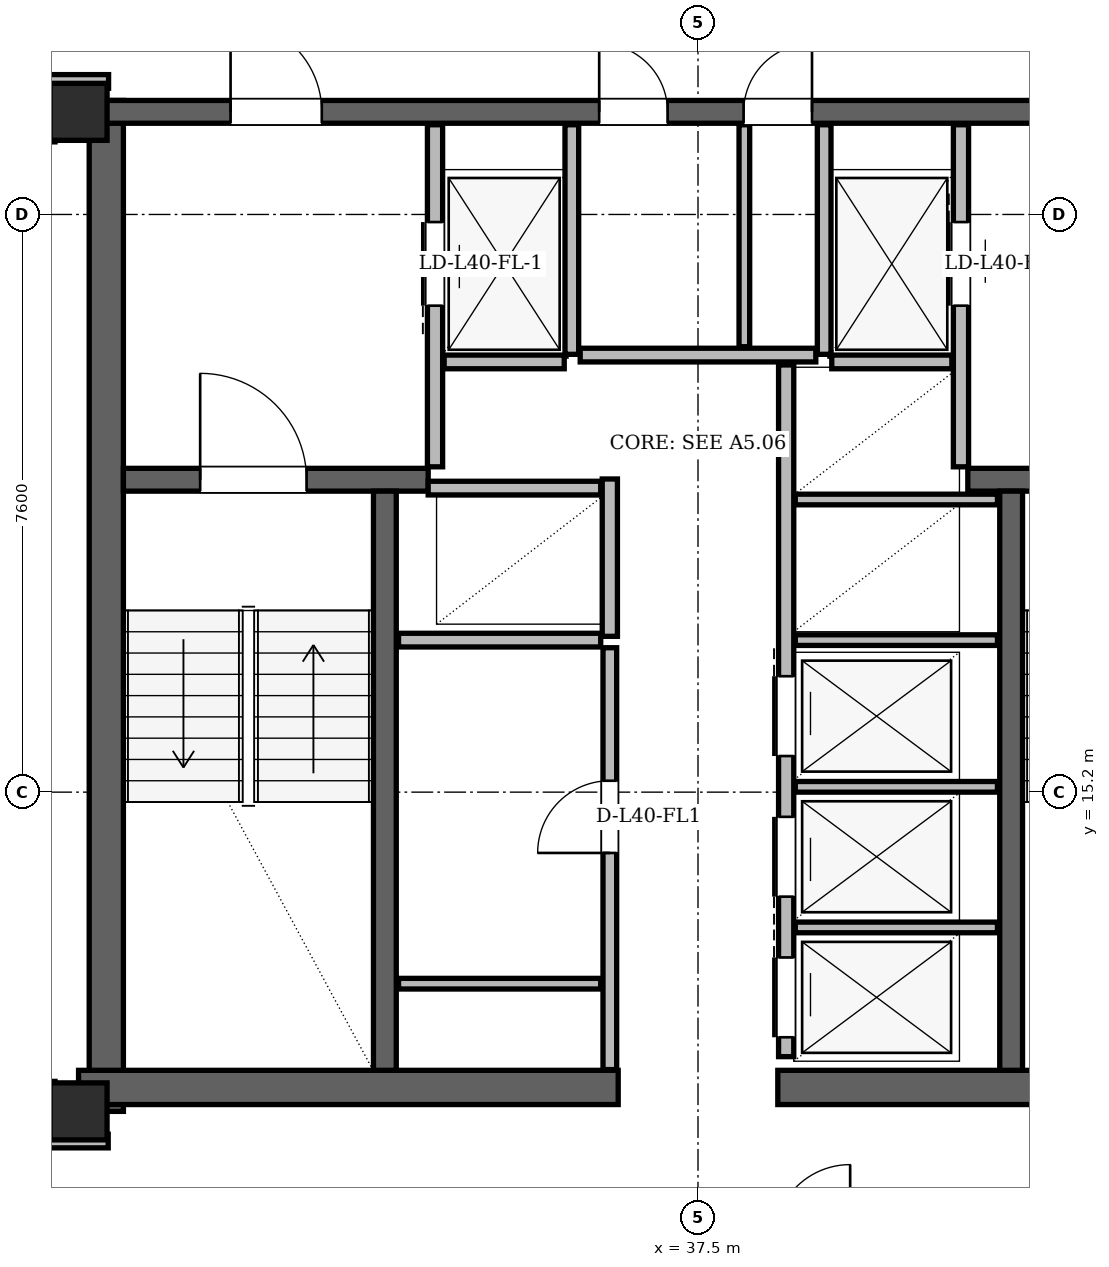
"""IFC4 building model, lengths in metres.
Left out: names, types, materials, properties, quantities, classifications, styles, units other than length and angle.
Written with IfcOpenShell. Run it as: python <this file> out.ifc"""

import sys

from ifc_helpers import new_model, si_unit, direction, frame, frame_2d, origin, origin_2d, place, context, subcontext, project, spatial, rectangle, hollow_rectangle, extrude, element, fill, save


model = new_model("IFC4")
c1 = context("Model", 3, precision=1e-05, world=origin(), true_north=direction((0.0, 1.0)))
c2 = subcontext(c1, "Body", "Model", "MODEL_VIEW")
j1 = project(units=[si_unit("LENGTHUNIT", "METRE"), si_unit("PLANEANGLEUNIT", "RADIAN")], contexts=[c1])
p1 = place(None, origin())
s1 = spatial("IfcSite", under=j1, at=p1, CompositionType="ELEMENT")
p2 = place(p1, origin())
s2 = spatial("IfcBuilding", under=s1, at=p2, CompositionType="ELEMENT")
p3 = place(p2, frame((0.0, 0.0, 153.0)))
s3 = spatial("IfcBuildingStorey", under=s2, at=p3, CompositionType="ELEMENT", Elevation=153.0)
for number, where, z_axis, x_axis in (
    (1, (29.35, 11.0, 0.0), (0.0, 0.0, 1.0), (1.0, 0.0, 0.0)),
    (2, (29.35, 24.15, 0.0), (0.0, 0.0, 1.0), (1.0, 0.0, 0.0)),
):
    element("IfcColumn", number, at=place(p3, frame(where, z_axis=z_axis, x_axis=x_axis)), inside=s3, PredefinedType="COLUMN", context=c2, shape_type="SweptSolid", body=[
        extrude(hollow_rectangle(XDim=0.75, YDim=0.75, WallThickness=0.06, at=origin_2d()), origin(), (0.0, 0.0, 1.0), 3.6),
    ])
p4 = place(p3, frame((29.715, 11.0, 0.0), z_axis=(0.0, 0.0, 1.0), x_axis=(0.0, 1.0, 0.0)))
e3 = element("IfcWall", 3, at=p4, inside=s3, PredefinedType="SHEAR", context=c2, shape_type="SweptSolid", body=[
    extrude(rectangle(XDim=13.3, YDim=0.45, at=frame_2d((6.65, 0.0))), origin(), (0.0, 0.0, 1.0), 3.38),
])
for number, where, z_axis, x_axis in (
    (4, (29.35, 11.315, 0.0), (0.0, 0.0, 1.0), (1.0, 0.0, 0.0)),
    (5, (38.55, 11.315, 0.0), (0.0, 0.0, 1.0), (1.0, 0.0, 0.0)),
):
    element("IfcWall", number, at=place(p3, frame(where, z_axis=z_axis, x_axis=x_axis)), inside=s3, PredefinedType="SHEAR", context=c2, shape_type="SweptSolid", body=[
        extrude(rectangle(XDim=7.1, YDim=0.45, at=frame_2d((3.55, 0.0))), origin(), (0.0, 0.0, 1.0), 3.38),
    ])
p5 = place(p3, frame((29.65, 24.15, 0.0), z_axis=(0.0, 0.0, 1.0), x_axis=(1.0, 0.0, 0.0)))
e6 = element("IfcWall", 6, at=p5, inside=s3, PredefinedType="SHEAR", context=c2, shape_type="SweptSolid", body=[
    extrude(rectangle(XDim=15.7, YDim=0.3, at=frame_2d((7.85, 0.0))), origin(), (0.0, 0.0, 1.0), 3.38),
])
p6 = place(p5, frame((1.7, 0.0, 0.0)))
e7 = element("IfcOpeningElement", 7, at=p6, cuts=e6, PredefinedType="OPENING", context=c2, shape_type="SweptSolid", body=[
    extrude(rectangle(XDim=1.2, YDim=2.2, at=frame_2d((0.6, 1.1))), frame((0.0, 0.15, 0.0), z_axis=(0.0, -1.0, 0.0), x_axis=(1.0, 0.0, 0.0)), (0.0, 0.0, 1.0), 0.3),
])
p7 = place(p5, frame((12.8, 0.0, 0.0)))
e8 = element("IfcOpeningElement", 8, at=p7, cuts=e6, PredefinedType="OPENING", context=c2, shape_type="SweptSolid", body=[
    extrude(rectangle(XDim=1.2, YDim=2.2, at=frame_2d((0.6, 1.1))), frame((0.0, 0.15, 0.0), z_axis=(0.0, -1.0, 0.0), x_axis=(1.0, 0.0, 0.0)), (0.0, 0.0, 1.0), 0.3),
])
p8 = place(p5, frame((6.55, 0.0, 0.0)))
e9 = element("IfcOpeningElement", 9, at=p8, cuts=e6, PredefinedType="OPENING", context=c2, shape_type="SweptSolid", body=[
    extrude(rectangle(XDim=0.9, YDim=2.05, at=frame_2d((0.45, 1.025))), frame((0.0, 0.15, 0.0), z_axis=(0.0, -1.0, 0.0), x_axis=(1.0, 0.0, 0.0)), (0.0, 0.0, 1.0), 0.3),
])
p9 = place(p5, frame((8.45, 0.0, 0.0)))
e10 = element("IfcOpeningElement", 10, at=p9, cuts=e6, PredefinedType="OPENING", context=c2, shape_type="SweptSolid", body=[
    extrude(rectangle(XDim=0.9, YDim=2.05, at=frame_2d((0.45, 1.025))), frame((0.0, 0.15, 0.0), z_axis=(0.0, -1.0, 0.0), x_axis=(1.0, 0.0, 0.0)), (0.0, 0.0, 1.0), 0.3),
])
p10 = place(p3, frame((29.94, 19.31, 0.0), z_axis=(0.0, 0.0, 1.0), x_axis=(1.0, 0.0, 0.0)))
e11 = element("IfcWall", 11, at=p10, inside=s3, PredefinedType="SHEAR", context=c2, shape_type="SweptSolid", body=[
    extrude(rectangle(XDim=4.01, YDim=0.3, at=frame_2d((2.005, 0.0))), origin(), (0.0, 0.0, 1.0), 3.38),
])
p11 = place(p10, frame((1.01, 0.0, 0.0)))
e12 = element("IfcOpeningElement", 12, at=p11, cuts=e11, PredefinedType="OPENING", context=c2, shape_type="SweptSolid", body=[
    extrude(rectangle(XDim=1.4, YDim=2.2, at=frame_2d((0.7, 1.1))), frame((0.0, 0.15, 0.0), z_axis=(0.0, -1.0, 0.0), x_axis=(1.0, 0.0, 0.0)), (0.0, 0.0, 1.0), 0.3),
])
p12 = place(p3, frame((41.05, 19.31, 0.0), z_axis=(0.0, 0.0, 1.0), x_axis=(1.0, 0.0, 0.0)))
e13 = element("IfcWall", 13, at=p12, inside=s3, PredefinedType="SHEAR", context=c2, shape_type="SweptSolid", body=[
    extrude(rectangle(XDim=4.01, YDim=0.3, at=frame_2d((2.005, 0.0))), origin(), (0.0, 0.0, 1.0), 3.38),
])
p13 = place(p12, frame((1.6, 0.0, 0.0)))
e14 = element("IfcOpeningElement", 14, at=p13, cuts=e13, PredefinedType="OPENING", context=c2, shape_type="SweptSolid", body=[
    extrude(rectangle(XDim=1.4, YDim=2.2, at=frame_2d((0.7, 1.1))), frame((0.0, 0.15, 0.0), z_axis=(0.0, -1.0, 0.0), x_axis=(1.0, 0.0, 0.0)), (0.0, 0.0, 1.0), 0.3),
])
for number, where, z_axis, x_axis in (
    (15, (33.38, 11.54, 0.0), (0.0, 0.0, 1.0), (0.0, 1.0, 0.0)),
    (16, (41.62, 11.54, 0.0), (0.0, 0.0, 1.0), (0.0, 1.0, 0.0)),
):
    element("IfcWall", number, at=place(p3, frame(where, z_axis=z_axis, x_axis=x_axis)), inside=s3, PredefinedType="SHEAR", context=c2, shape_type="SweptSolid", body=[
        extrude(rectangle(XDim=7.62, YDim=0.3, at=frame_2d((3.81, 0.0))), origin(), (0.0, 0.0, 1.0), 3.38),
    ])
p14 = place(p3, frame((32.818, 43.322, 0.0), z_axis=(0.0, 0.0, 1.0), x_axis=(-0.500000946011, -0.866024857604, 0.0)))
e17 = element("IfcWall", 17, at=p14, inside=s3, PredefinedType="SOLIDWALL", context=c2, shape_type="SweptSolid", body=[
    extrude(rectangle(XDim=35.54, YDim=0.34, at=frame_2d((17.77, 0.0))), origin(), (0.0, 0.0, 1.0), 2.6),
])
p15 = place(p14, frame((6.579, 0.0, 0.0)))
e18 = element("IfcOpeningElement", 18, at=p15, cuts=e17, PredefinedType="OPENING", context=c2, shape_type="SweptSolid", body=[
    extrude(rectangle(XDim=1.5, YDim=2.2, at=frame_2d((0.75, 1.1))), frame((0.0, 0.17, 0.0), z_axis=(0.0, -1.0, 0.0), x_axis=(1.0, 0.0, 0.0)), (0.0, 0.0, 1.0), 0.34),
])
p16 = place(p14, frame((26.005, 0.0, 0.0)))
e19 = element("IfcOpeningElement", 19, at=p16, cuts=e17, PredefinedType="OPENING", context=c2, shape_type="SweptSolid", body=[
    extrude(rectangle(XDim=1.5, YDim=2.2, at=frame_2d((0.75, 1.1))), frame((0.0, 0.17, 0.0), z_axis=(0.0, -1.0, 0.0), x_axis=(1.0, 0.0, 0.0)), (0.0, 0.0, 1.0), 0.34),
])
p17 = place(p14, frame((33.049, 0.0, 0.85)))
e20 = element("IfcOpeningElement", 20, at=p17, cuts=e17, PredefinedType="OPENING", context=c2, shape_type="SweptSolid", body=[
    extrude(rectangle(XDim=1.2, YDim=1.48, at=frame_2d((0.6, 0.74))), frame((0.0, 0.17, 0.0), z_axis=(0.0, -1.0, 0.0), x_axis=(1.0, 0.0, 0.0)), (0.0, 0.0, 1.0), 0.34),
])
p18 = place(p14, frame((17.853, 0.0, 0.85)))
e21 = element("IfcOpeningElement", 21, at=p18, cuts=e17, PredefinedType="OPENING", context=c2, shape_type="SweptSolid", body=[
    extrude(rectangle(XDim=1.2, YDim=1.48, at=frame_2d((0.6, 0.74))), frame((0.0, 0.17, 0.0), z_axis=(0.0, -1.0, 0.0), x_axis=(1.0, 0.0, 0.0)), (0.0, 0.0, 1.0), 0.34),
])
p19 = place(p14, frame((11.661, 0.0, 0.85)))
e22 = element("IfcOpeningElement", 22, at=p19, cuts=e17, PredefinedType="OPENING", context=c2, shape_type="SweptSolid", body=[
    extrude(rectangle(XDim=1.2, YDim=1.48, at=frame_2d((0.6, 0.74))), frame((0.0, 0.17, 0.0), z_axis=(0.0, -1.0, 0.0), x_axis=(1.0, 0.0, 0.0)), (0.0, 0.0, 1.0), 0.34),
])
p20 = place(p14, frame((14.317, 0.0, 0.85)))
e23 = element("IfcOpeningElement", 23, at=p20, cuts=e17, PredefinedType="OPENING", context=c2, shape_type="SweptSolid", body=[
    extrude(rectangle(XDim=1.2, YDim=1.48, at=frame_2d((0.6, 0.74))), frame((0.0, 0.17, 0.0), z_axis=(0.0, -1.0, 0.0), x_axis=(1.0, 0.0, 0.0)), (0.0, 0.0, 1.0), 0.34),
])
p21 = place(p14, frame((2.865, 0.0, 0.85)))
e24 = element("IfcOpeningElement", 24, at=p21, cuts=e17, PredefinedType="OPENING", context=c2, shape_type="SweptSolid", body=[
    extrude(rectangle(XDim=1.6, YDim=1.64, at=frame_2d((0.8, 0.82))), frame((0.0, 0.17, 0.0), z_axis=(0.0, -1.0, 0.0), x_axis=(1.0, 0.0, 0.0)), (0.0, 0.0, 1.0), 0.34),
])
p22 = place(p3, frame((34.04, 19.48, 0.0), z_axis=(0.0, 0.0, 1.0), x_axis=(0.0, 1.0, 0.0)))
e25 = element("IfcWall", 25, at=p22, inside=s3, PredefinedType="PARTITIONING", context=c2, shape_type="SweptSolid", body=[
    extrude(rectangle(XDim=4.5, YDim=0.2, at=frame_2d((2.25, 0.0))), origin(), (0.0, 0.0, 1.0), 2.42),
])
p23 = place(p22, frame((2.12, 0.0, 0.0)))
e26 = element("IfcOpeningElement", 26, at=p23, cuts=e25, PredefinedType="OPENING", context=c2, shape_type="SweptSolid", body=[
    extrude(rectangle(XDim=1.1, YDim=2.2, at=frame_2d((0.55, 1.1))), frame((0.0, 0.1, 0.0), z_axis=(0.0, -1.0, 0.0), x_axis=(1.0, 0.0, 0.0)), (0.0, 0.0, 1.0), 0.2),
])
p24 = place(p3, frame((35.84, 20.96, 0.0), z_axis=(0.0, 0.0, 1.0), x_axis=(0.0, 1.0, 0.0)))
e27 = element("IfcWall", 27, at=p24, inside=s3, PredefinedType="PARTITIONING", context=c2, shape_type="SweptSolid", body=[
    extrude(rectangle(XDim=3.02, YDim=0.18, at=frame_2d((1.51, 0.0))), origin(), (0.0, 0.0, 1.0), 2.42),
])
p25 = place(p3, frame((34.16, 20.86, 0.0), z_axis=(0.0, 0.0, 1.0), x_axis=(1.0, 0.0, 0.0)))
e28 = element("IfcWall", 28, at=p25, inside=s3, PredefinedType="PARTITIONING", context=c2, shape_type="SweptSolid", body=[
    extrude(rectangle(XDim=1.58, YDim=0.18, at=frame_2d((0.79, 0.0))), origin(), (0.0, 0.0, 1.0), 3.38),
])
p26 = place(p3, frame((40.96, 19.48, 0.0), z_axis=(0.0, 0.0, 1.0), x_axis=(0.0, 1.0, 0.0)))
e29 = element("IfcWall", 29, at=p26, inside=s3, PredefinedType="PARTITIONING", context=c2, shape_type="SweptSolid", body=[
    extrude(rectangle(XDim=4.5, YDim=0.2, at=frame_2d((2.25, 0.0))), origin(), (0.0, 0.0, 1.0), 2.42),
])
p27 = place(p26, frame((2.12, 0.0, 0.0)))
e30 = element("IfcOpeningElement", 30, at=p27, cuts=e29, PredefinedType="OPENING", context=c2, shape_type="SweptSolid", body=[
    extrude(rectangle(XDim=1.1, YDim=2.2, at=frame_2d((0.55, 1.1))), frame((0.0, 0.1, 0.0), z_axis=(0.0, -1.0, 0.0), x_axis=(1.0, 0.0, 0.0)), (0.0, 0.0, 1.0), 0.2),
])
p28 = place(p3, frame((39.16, 20.96, 0.0), z_axis=(0.0, 0.0, 1.0), x_axis=(0.0, 1.0, 0.0)))
e31 = element("IfcWall", 31, at=p28, inside=s3, PredefinedType="PARTITIONING", context=c2, shape_type="SweptSolid", body=[
    extrude(rectangle(XDim=3.02, YDim=0.18, at=frame_2d((1.51, 0.0))), origin(), (0.0, 0.0, 1.0), 2.42),
])
p29 = place(p3, frame((39.26, 20.86, 0.0), z_axis=(0.0, 0.0, 1.0), x_axis=(1.0, 0.0, 0.0)))
e32 = element("IfcWall", 32, at=p29, inside=s3, PredefinedType="PARTITIONING", context=c2, shape_type="SweptSolid", body=[
    extrude(rectangle(XDim=1.58, YDim=0.18, at=frame_2d((0.79, 0.0))), origin(), (0.0, 0.0, 1.0), 3.38),
])
p30 = place(p3, frame((36.34, 17.25, 0.0), z_axis=(0.0, 0.0, 1.0), x_axis=(0.0, 1.0, 0.0)))
e33 = element("IfcWall", 33, at=p30, inside=s3, PredefinedType="PARTITIONING", context=c2, shape_type="SweptSolid", body=[
    extrude(rectangle(XDim=2.07, YDim=0.2, at=frame_2d((1.035, 0.0))), origin(), (0.0, 0.0, 1.0), 3.38),
])
p31 = place(p3, frame((33.95, 19.2, 0.0), z_axis=(0.0, 0.0, 1.0), x_axis=(1.0, 0.0, 0.0)))
e34 = element("IfcWall", 34, at=p31, inside=s3, PredefinedType="PARTITIONING", context=c2, shape_type="SweptSolid", body=[
    extrude(rectangle(XDim=2.27, YDim=0.18, at=frame_2d((1.135, 0.0))), origin(), (0.0, 0.0, 1.0), 3.38),
])
p32 = place(p3, frame((33.56, 17.2, 0.0), z_axis=(0.0, 0.0, 1.0), x_axis=(1.0, 0.0, 0.0)))
e35 = element("IfcWall", 35, at=p32, inside=s3, PredefinedType="PARTITIONING", context=c2, shape_type="SweptSolid", body=[
    extrude(rectangle(XDim=2.66, YDim=0.18, at=frame_2d((1.33, 0.0))), origin(), (0.0, 0.0, 1.0), 3.38),
])
p33 = place(p3, frame((36.34, 11.55, 0.0), z_axis=(0.0, 0.0, 1.0), x_axis=(0.0, 1.0, 0.0)))
e36 = element("IfcWall", 36, at=p33, inside=s3, PredefinedType="PARTITIONING", context=c2, shape_type="SweptSolid", body=[
    extrude(rectangle(XDim=5.55, YDim=0.18, at=frame_2d((2.775, 0.0))), origin(), (0.0, 0.0, 1.0), 3.38),
])
p34 = place(p33, frame((2.85, 0.0, 0.0)))
e37 = element("IfcOpeningElement", 37, at=p34, cuts=e36, PredefinedType="OPENING", context=c2, shape_type="SweptSolid", body=[
    extrude(rectangle(XDim=0.95, YDim=2.1, at=frame_2d((0.475, 1.05))), frame((0.0, 0.09, 0.0), z_axis=(0.0, -1.0, 0.0), x_axis=(1.0, 0.0, 0.0)), (0.0, 0.0, 1.0), 0.18),
])
p35 = place(p3, frame((33.56, 12.68, 0.0), z_axis=(0.0, 0.0, 1.0), x_axis=(1.0, 0.0, 0.0)))
e38 = element("IfcWall", 38, at=p35, inside=s3, PredefinedType="PARTITIONING", context=c2, shape_type="SweptSolid", body=[
    extrude(rectangle(XDim=2.66, YDim=0.14, at=frame_2d((1.33, 0.0))), origin(), (0.0, 0.0, 1.0), 3.38),
])
p36 = place(p3, frame((38.66, 11.72, 0.0), z_axis=(0.0, 0.0, 1.0), x_axis=(0.0, 1.0, 0.0)))
e39 = element("IfcWall", 39, at=p36, inside=s3, PredefinedType="PARTITIONING", context=c2, shape_type="SweptSolid", body=[
    extrude(rectangle(XDim=9.1, YDim=0.2, at=frame_2d((4.55, 0.0))), origin(), (0.0, 0.0, 1.0), 3.38),
])
p37 = place(p36, frame((0.255, 0.0, 0.0)))
e40 = element("IfcOpeningElement", 40, at=p37, cuts=e39, PredefinedType="OPENING", context=c2, shape_type="SweptSolid", body=[
    extrude(rectangle(XDim=1.05, YDim=2.15, at=frame_2d((0.525, 1.075))), frame((0.0, 0.1, 0.0), z_axis=(0.0, -1.0, 0.0), x_axis=(1.0, 0.0, 0.0)), (0.0, 0.0, 1.0), 0.2),
])
p38 = place(p36, frame((2.105, 0.0, 0.0)))
e41 = element("IfcOpeningElement", 41, at=p38, cuts=e39, PredefinedType="OPENING", context=c2, shape_type="SweptSolid", body=[
    extrude(rectangle(XDim=1.05, YDim=2.15, at=frame_2d((0.525, 1.075))), frame((0.0, 0.1, 0.0), z_axis=(0.0, -1.0, 0.0), x_axis=(1.0, 0.0, 0.0)), (0.0, 0.0, 1.0), 0.2),
])
p39 = place(p36, frame((3.955, 0.0, 0.0)))
e42 = element("IfcOpeningElement", 42, at=p39, cuts=e39, PredefinedType="OPENING", context=c2, shape_type="SweptSolid", body=[
    extrude(rectangle(XDim=1.05, YDim=2.15, at=frame_2d((0.525, 1.075))), frame((0.0, 0.1, 0.0), z_axis=(0.0, -1.0, 0.0), x_axis=(1.0, 0.0, 0.0)), (0.0, 0.0, 1.0), 0.2),
])
for number, where, z_axis, x_axis in (
    (43, (38.78, 13.42, 0.0), (0.0, 0.0, 1.0), (1.0, 0.0, 0.0)),
    (44, (38.78, 15.27, 0.0), (0.0, 0.0, 1.0), (1.0, 0.0, 0.0)),
    (45, (38.78, 17.2, 0.0), (0.0, 0.0, 1.0), (1.0, 0.0, 0.0)),
    (46, (38.78, 19.05, 0.0), (0.0, 0.0, 1.0), (1.0, 0.0, 0.0)),
):
    element("IfcWall", number, at=place(p3, frame(where, z_axis=z_axis, x_axis=x_axis)), inside=s3, PredefinedType="PARTITIONING", context=c2, shape_type="SweptSolid", body=[
        extrude(rectangle(XDim=2.66, YDim=0.14, at=frame_2d((1.33, 0.0))), origin(), (0.0, 0.0, 1.0), 3.38),
    ])
p40 = place(p3, frame((35.95, 20.95, 0.0), z_axis=(0.0, 0.0, 1.0), x_axis=(1.0, 0.0, 0.0)))
e47 = element("IfcWall", 47, at=p40, inside=s3, PredefinedType="PARTITIONING", context=c2, shape_type="SweptSolid", body=[
    extrude(rectangle(XDim=3.1, YDim=0.18, at=frame_2d((1.55, 0.0))), origin(), (0.0, 0.0, 1.0), 3.38),
])
p41 = place(p3, frame((38.11, 21.06, 0.0), z_axis=(0.0, 0.0, 1.0), x_axis=(0.0, 1.0, 0.0)))
e48 = element("IfcWall", 48, at=p41, inside=s3, PredefinedType="PARTITIONING", context=c2, shape_type="SweptSolid", body=[
    extrude(rectangle(XDim=2.92, YDim=0.14, at=frame_2d((1.46, 0.0))), origin(), (0.0, 0.0, 1.0), 2.42),
])
p42 = place(p3, frame((28.96, 10.61, 0.0), z_axis=(0.0, 0.0, 1.0), x_axis=(1.0, 0.0, 0.0)))
e49 = element("IfcWall", 49, at=p42, inside=s3, PredefinedType="PARTITIONING", context=c2, shape_type="SweptSolid", body=[
    extrude(rectangle(XDim=0.78, YDim=0.18, at=frame_2d((0.39, 0.0))), origin(), (0.0, 0.0, 1.0), 3.38),
])
p43 = place(p3, frame((28.955, 24.55, 0.0), z_axis=(0.0, 0.0, 1.0), x_axis=(1.0, 0.0, 0.0)))
e50 = element("IfcWall", 50, at=p43, inside=s3, PredefinedType="PARTITIONING", context=c2, shape_type="SweptSolid", body=[
    extrude(rectangle(XDim=0.79, YDim=0.18, at=frame_2d((0.395, 0.0))), origin(), (0.0, 0.0, 1.0), 2.842),
])
p44 = place(p3, frame((28.95, 10.95, 0.0), z_axis=(0.0, 0.0, 1.0), x_axis=(0.0, 1.0, 0.0)))
e51 = element("IfcWall", 51, at=p44, inside=s3, PredefinedType="PARTITIONING", context=c2, shape_type="SweptSolid", body=[
    extrude(rectangle(XDim=0.445, YDim=0.18, at=frame_2d((0.223, 0.0))), origin(), (0.0, 0.0, 1.0), 2.842),
])
p45 = place(p3, frame((28.95, 23.755, 0.0), z_axis=(0.0, 0.0, 1.0), x_axis=(0.0, 1.0, 0.0)))
e52 = element("IfcWall", 52, at=p45, inside=s3, PredefinedType="PARTITIONING", context=c2, shape_type="SweptSolid", body=[
    extrude(rectangle(XDim=0.565, YDim=0.18, at=frame_2d((0.283, 0.0))), origin(), (0.0, 0.0, 1.0), 3.38),
])
p46 = place(p34, origin())
e53 = element("IfcDoor", 53, at=p46, inside=s3, OperationType="SINGLE_SWING_LEFT", PredefinedType="DOOR", context=c2, shape_type="SweptSolid", body=[
    extrude(rectangle(XDim=0.95, YDim=2.1, at=frame_2d((0.475, 1.05))), frame((0.0, 0.025, 0.0), z_axis=(0.0, -1.0, 0.0), x_axis=(1.0, 0.0, 0.0)), (0.0, 0.0, 1.0), 0.05),
])
fill(e37, e53)
p47 = place(p23, origin())
e54 = element("IfcDoor", 54, at=p47, inside=s3, OperationType="SLIDING_TO_LEFT", PredefinedType="DOOR", context=c2, shape_type="SweptSolid", body=[
    extrude(rectangle(XDim=1.1, YDim=2.2, at=frame_2d((0.55, 1.1))), frame((0.0, 0.025, 0.0), z_axis=(0.0, -1.0, 0.0), x_axis=(1.0, 0.0, 0.0)), (0.0, 0.0, 1.0), 0.05),
])
fill(e26, e54)
p48 = place(p27, origin())
e55 = element("IfcDoor", 55, at=p48, inside=s3, OperationType="SLIDING_TO_RIGHT", PredefinedType="DOOR", context=c2, shape_type="SweptSolid", body=[
    extrude(rectangle(XDim=1.1, YDim=2.2, at=frame_2d((0.55, 1.1))), frame((0.0, 0.025, 0.0), z_axis=(0.0, -1.0, 0.0), x_axis=(1.0, 0.0, 0.0)), (0.0, 0.0, 1.0), 0.05),
])
fill(e30, e55)
p49 = place(p37, origin())
e56 = element("IfcDoor", 56, at=p49, inside=s3, OperationType="SLIDING_TO_RIGHT", PredefinedType="DOOR", context=c2, shape_type="SweptSolid", body=[
    extrude(rectangle(XDim=1.05, YDim=2.15, at=frame_2d((0.525, 1.075))), frame((0.0, 0.025, 0.0), z_axis=(0.0, -1.0, 0.0), x_axis=(1.0, 0.0, 0.0)), (0.0, 0.0, 1.0), 0.05),
])
fill(e40, e56)
p50 = place(p38, origin())
e57 = element("IfcDoor", 57, at=p50, inside=s3, OperationType="SLIDING_TO_LEFT", PredefinedType="DOOR", context=c2, shape_type="SweptSolid", body=[
    extrude(rectangle(XDim=1.05, YDim=2.15, at=frame_2d((0.525, 1.075))), frame((0.0, 0.025, 0.0), z_axis=(0.0, -1.0, 0.0), x_axis=(1.0, 0.0, 0.0)), (0.0, 0.0, 1.0), 0.05),
])
fill(e41, e57)
p51 = place(p39, origin())
e58 = element("IfcDoor", 58, at=p51, inside=s3, OperationType="SLIDING_TO_RIGHT", PredefinedType="DOOR", context=c2, shape_type="SweptSolid", body=[
    extrude(rectangle(XDim=1.05, YDim=2.15, at=frame_2d((0.525, 1.075))), frame((0.0, 0.025, 0.0), z_axis=(0.0, -1.0, 0.0), x_axis=(1.0, 0.0, 0.0)), (0.0, 0.0, 1.0), 0.05),
])
fill(e42, e58)
p52 = place(p11, origin())
e59 = element("IfcDoor", 59, at=p52, inside=s3, OperationType="SINGLE_SWING_LEFT", PredefinedType="DOOR", context=c2, shape_type="SweptSolid", body=[
    extrude(rectangle(XDim=1.4, YDim=2.2, at=frame_2d((0.7, 1.1))), frame((0.0, 0.025, 0.0), z_axis=(0.0, -1.0, 0.0), x_axis=(1.0, 0.0, 0.0)), (0.0, 0.0, 1.0), 0.05),
])
fill(e12, e59)
p53 = place(p6, origin())
e60 = element("IfcDoor", 60, at=p53, inside=s3, OperationType="SINGLE_SWING_LEFT", PredefinedType="DOOR", context=c2, shape_type="SweptSolid", body=[
    extrude(rectangle(XDim=1.2, YDim=2.2, at=frame_2d((0.6, 1.1))), frame((0.0, 0.025, 0.0), z_axis=(0.0, -1.0, 0.0), x_axis=(1.0, 0.0, 0.0)), (0.0, 0.0, 1.0), 0.05),
])
fill(e7, e60)
p54 = place(p8, origin())
e61 = element("IfcDoor", 61, at=p54, inside=s3, OperationType="SINGLE_SWING_LEFT", PredefinedType="DOOR", context=c2, shape_type="SweptSolid", body=[
    extrude(rectangle(XDim=0.9, YDim=2.05, at=frame_2d((0.45, 1.025))), frame((0.0, 0.025, 0.0), z_axis=(0.0, -1.0, 0.0), x_axis=(1.0, 0.0, 0.0)), (0.0, 0.0, 1.0), 0.05),
])
fill(e9, e61)
p55 = place(p9, origin())
e62 = element("IfcDoor", 62, at=p55, inside=s3, OperationType="SINGLE_SWING_RIGHT", PredefinedType="DOOR", context=c2, shape_type="SweptSolid", body=[
    extrude(rectangle(XDim=0.9, YDim=2.05, at=frame_2d((0.45, 1.025))), frame((0.0, 0.025, 0.0), z_axis=(0.0, -1.0, 0.0), x_axis=(1.0, 0.0, 0.0)), (0.0, 0.0, 1.0), 0.05),
])
fill(e10, e62)
save(model, sys.argv[1])
